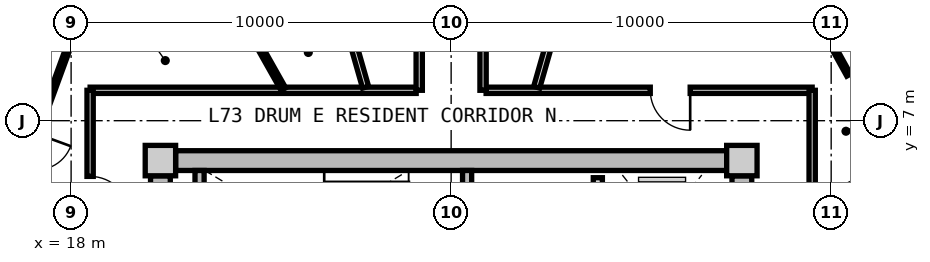
"""IFC4 building model, lengths in metres.
Left out: names, types, materials, properties, quantities, classifications, styles, units other than length and angle.
Written with IfcOpenShell. Run it as: python <this file> out.ifc"""

import sys

from ifc_helpers import new_model, si_unit, direction, frame, frame_2d, origin, origin_2d, place, context, subcontext, project, spatial, rectangle, extrude, source, transform, mapped, element, fill, save


model = new_model("IFC4")
c1 = context("Model", 3, precision=1e-05, world=origin(), true_north=direction((0.0, 1.0)))
c2 = subcontext(c1, "Body", "Model", "MODEL_VIEW")
j1 = project(units=[si_unit("LENGTHUNIT", "METRE"), si_unit("PLANEANGLEUNIT", "RADIAN")], contexts=[c1])
p1 = place(None, origin())
s1 = spatial("IfcSite", under=j1, at=p1, CompositionType="ELEMENT")
p2 = place(p1, origin())
s2 = spatial("IfcBuilding", under=s1, at=p2, CompositionType="ELEMENT")
p3 = place(p2, frame((0.0, 0.0, 235.25)))
s3 = spatial("IfcBuildingStorey", under=s2, at=p3, CompositionType="ELEMENT", Elevation=235.25)
m1 = source(origin(), c2, "Body", "SweptSolid", [
    extrude(rectangle(XDim=0.8, YDim=0.8, at=origin_2d()), origin(), (0.0, 0.0, 1.0), 3.05),
])
for number, where, z_axis, x_axis in (
    (1, (35.65, 5.95, 0.0), (0.0, 0.0, 1.0), (1.0, 0.0, 0.0)),
    (2, (20.35, 5.95, 0.0), (0.0, 0.0, 1.0), (1.0, 0.0, 0.0)),
):
    element("IfcColumn", number, at=place(p3, frame(where, z_axis=z_axis, x_axis=x_axis)), inside=s3, PredefinedType="COLUMN", context=c2, shape_type="MappedRepresentation", body=[
        mapped(m1, transform((0.0, 0.0, 0.0), x_axis=(1.0, 0.0, 0.0), y_axis=(0.0, 1.0, 0.0), z_axis=(0.0, 0.0, 1.0), scale=1.0)),
    ])
m2 = source(origin(), c2, "Body", "SweptSolid", [
    extrude(rectangle(XDim=14.5, YDim=0.52, at=frame_2d((7.25, 0.0))), origin(), (0.0, 0.0, 1.0), 2.81),
])
p4 = place(p3, frame((20.75, 5.95, 0.0), z_axis=(0.0, 0.0, 1.0), x_axis=(1.0, 0.0, 0.0)))
e3 = element("IfcWall", 3, at=p4, inside=s3, PredefinedType="SHEAR", context=c2, shape_type="MappedRepresentation", body=[
    mapped(m2, transform((0.0, 0.0, 0.0), x_axis=(1.0, 0.0, 0.0), y_axis=(0.0, 1.0, 0.0), z_axis=(0.0, 0.0, 1.0), scale=1.0)),
])
m3 = source(origin(), c2, "Body", "SweptSolid", [
    extrude(rectangle(XDim=11.1, YDim=0.52, at=frame_2d((5.55, 0.0))), origin(), (0.0, 0.0, 1.0), 2.81),
])
p5 = place(p3, frame((20.35, -5.55, 0.0), z_axis=(0.0, 0.0, 1.0), x_axis=(0.0, 1.0, 0.0)))
e4 = element("IfcWall", 4, at=p5, inside=s3, PredefinedType="SHEAR", context=c2, shape_type="MappedRepresentation", body=[
    mapped(m3, transform((0.0, 0.0, 0.0), x_axis=(1.0, 0.0, 0.0), y_axis=(0.0, 1.0, 0.0), z_axis=(0.0, 0.0, 1.0), scale=1.0)),
])
p6 = place(p5, frame((3.8, 0.0, 0.0)))
e5 = element("IfcOpeningElement", 5, at=p6, cuts=e4, PredefinedType="OPENING", context=c2, shape_type="SweptSolid", body=[
    extrude(rectangle(XDim=1.2, YDim=2.15, at=frame_2d((0.6, 1.075))), frame((0.0, 0.27, 0.0), z_axis=(0.0, -1.0, 0.0), x_axis=(1.0, 0.0, 0.0)), (0.0, 0.0, 1.0), 0.54),
])
p7 = place(p3, frame((35.65, 5.55, 0.0), z_axis=(0.0, 0.0, 1.0), x_axis=(0.0, -1.0, 0.0)))
e6 = element("IfcWall", 6, at=p7, inside=s3, PredefinedType="SHEAR", context=c2, shape_type="MappedRepresentation", body=[
    mapped(m3, transform((0.0, 0.0, 0.0), x_axis=(1.0, 0.0, 0.0), y_axis=(0.0, 1.0, 0.0), z_axis=(0.0, 0.0, 1.0), scale=1.0)),
])
p8 = place(p7, frame((5.65, 0.0, 0.0)))
e7 = element("IfcOpeningElement", 7, at=p8, cuts=e6, PredefinedType="OPENING", context=c2, shape_type="SweptSolid", body=[
    extrude(rectangle(XDim=1.2, YDim=2.15, at=frame_2d((0.6, 1.075))), frame((0.0, 0.27, 0.0), z_axis=(0.0, -1.0, 0.0), x_axis=(1.0, 0.0, 0.0)), (0.0, 0.0, 1.0), 0.54),
])
m4 = source(origin(), c2, "Body", "SweptSolid", [
    extrude(rectangle(XDim=3.24, YDim=0.24, at=frame_2d((1.62, 0.0))), origin(), (0.0, 0.0, 1.0), 2.81),
])
p9 = place(p3, frame((21.38, 2.45, 0.0), z_axis=(0.0, 0.0, 1.0), x_axis=(0.0, 1.0, 0.0)))
e8 = element("IfcWall", 8, at=p9, inside=s3, PredefinedType="PARTITIONING", context=c2, shape_type="MappedRepresentation", body=[
    mapped(m4, transform((0.0, 0.0, 0.0), x_axis=(1.0, 0.0, 0.0), y_axis=(0.0, 1.0, 0.0), z_axis=(0.0, 0.0, 1.0), scale=1.0)),
])
p10 = place(p3, frame((28.42, 2.45, 0.0), z_axis=(0.0, 0.0, 1.0), x_axis=(0.0, 1.0, 0.0)))
e9 = element("IfcWall", 9, at=p10, inside=s3, PredefinedType="PARTITIONING", context=c2, shape_type="MappedRepresentation", body=[
    mapped(m4, transform((0.0, 0.0, 0.0), x_axis=(1.0, 0.0, 0.0), y_axis=(0.0, 1.0, 0.0), z_axis=(0.0, 0.0, 1.0), scale=1.0)),
])
p11 = place(p10, frame((0.55, 0.0, 0.0)))
e10 = element("IfcOpeningElement", 10, at=p11, cuts=e9, PredefinedType="OPENING", context=c2, shape_type="SweptSolid", body=[
    extrude(rectangle(XDim=1.1, YDim=2.15, at=frame_2d((0.55, 1.075))), frame((0.0, 0.13, 0.0), z_axis=(0.0, -1.0, 0.0), x_axis=(1.0, 0.0, 0.0)), (0.0, 0.0, 1.0), 0.26),
])
m5 = source(origin(), c2, "Body", "SweptSolid", [
    extrude(rectangle(XDim=5.0, YDim=0.24, at=frame_2d((2.5, 0.0))), origin(), (0.0, 0.0, 1.0), 2.795),
])
p12 = place(p3, frame((31.86, 0.5, 0.0), z_axis=(0.0, 0.0, 1.0), x_axis=(0.0, 1.0, 0.0)))
e11 = element("IfcWall", 11, at=p12, inside=s3, PredefinedType="PARTITIONING", context=c2, shape_type="MappedRepresentation", body=[
    mapped(m5, transform((0.0, 0.0, 0.0), x_axis=(1.0, 0.0, 0.0), y_axis=(0.0, 1.0, 0.0), z_axis=(0.0, 0.0, 1.0), scale=1.0)),
])
p13 = place(p12, frame((3.05, 0.0, 0.0)))
e12 = element("IfcOpeningElement", 12, at=p13, cuts=e11, PredefinedType="OPENING", context=c2, shape_type="SweptSolid", body=[
    extrude(rectangle(XDim=1.3, YDim=2.2, at=frame_2d((0.65, 1.1))), frame((0.0, 0.13, 0.0), z_axis=(0.0, -1.0, 0.0), x_axis=(1.0, 0.0, 0.0)), (0.0, 0.0, 1.0), 0.26),
])
p14 = place(p12, frame((0.55, 0.0, 0.0)))
e13 = element("IfcOpeningElement", 13, at=p14, cuts=e11, PredefinedType="OPENING", context=c2, shape_type="SweptSolid", body=[
    extrude(rectangle(XDim=1.3, YDim=2.2, at=frame_2d((0.65, 1.1))), frame((0.0, 0.13, 0.0), z_axis=(0.0, -1.0, 0.0), x_axis=(1.0, 0.0, 0.0)), (0.0, 0.0, 1.0), 0.26),
])
m6 = source(origin(), c2, "Body", "SweptSolid", [
    extrude(rectangle(XDim=8.58, YDim=0.165, at=frame_2d((4.29, 0.0))), origin(), (0.0, 0.0, 1.0), 2.795),
])
p15 = place(p3, frame((18.5, 7.8, 0.0), z_axis=(0.0, 0.0, 1.0), x_axis=(1.0, 0.0, 0.0)))
e14 = element("IfcWall", 14, at=p15, inside=s3, PredefinedType="PARTITIONING", context=c2, shape_type="MappedRepresentation", body=[
    mapped(m6, transform((0.0, 0.0, 0.0), x_axis=(1.0, 0.0, 0.0), y_axis=(0.0, 1.0, 0.0), z_axis=(0.0, 0.0, 1.0), scale=1.0)),
])
p16 = place(p3, frame((28.92, 7.8, 0.0), z_axis=(0.0, 0.0, 1.0), x_axis=(1.0, 0.0, 0.0)))
e15 = element("IfcWall", 15, at=p16, inside=s3, PredefinedType="PARTITIONING", context=c2, shape_type="MappedRepresentation", body=[
    mapped(m6, transform((0.0, 0.0, 0.0), x_axis=(1.0, 0.0, 0.0), y_axis=(0.0, 1.0, 0.0), z_axis=(0.0, 0.0, 1.0), scale=1.0)),
])
p17 = place(p16, frame((4.32, 0.0, 0.0)))
e16 = element("IfcOpeningElement", 16, at=p17, cuts=e15, PredefinedType="OPENING", context=c2, shape_type="SweptSolid", body=[
    extrude(rectangle(XDim=1.05, YDim=2.15, at=frame_2d((0.525, 1.075))), frame((0.0, 0.093, 0.0), z_axis=(0.0, -1.0, 0.0), x_axis=(1.0, 0.0, 0.0)), (0.0, 0.0, 1.0), 0.185),
])
m7 = source(origin(), c2, "Body", "SweptSolid", [
    extrude(rectangle(XDim=6.88, YDim=0.165, at=frame_2d((3.44, 0.0))), origin(), (0.0, 0.0, 1.0), 2.795),
])
p18 = place(p3, frame((18.5, 0.92, 0.0), z_axis=(0.0, 0.0, 1.0), x_axis=(0.0, 1.0, 0.0)))
e17 = element("IfcWall", 17, at=p18, inside=s3, PredefinedType="PARTITIONING", context=c2, shape_type="MappedRepresentation", body=[
    mapped(m7, transform((0.0, 0.0, 0.0), x_axis=(1.0, 0.0, 0.0), y_axis=(0.0, 1.0, 0.0), z_axis=(0.0, 0.0, 1.0), scale=1.0)),
])
p19 = place(p18, frame((3.564, 0.0, 0.0)))
e18 = element("IfcOpeningElement", 18, at=p19, cuts=e17, PredefinedType="OPENING", context=c2, shape_type="SweptSolid", body=[
    extrude(rectangle(XDim=1.05, YDim=2.15, at=frame_2d((0.525, 1.075))), frame((0.0, 0.093, 0.0), z_axis=(0.0, -1.0, 0.0), x_axis=(1.0, 0.0, 0.0)), (0.0, 0.0, 1.0), 0.185),
])
p20 = place(p3, frame((37.5, 7.8, 0.0), z_axis=(0.0, 0.0, 1.0), x_axis=(0.0, -1.0, 0.0)))
e19 = element("IfcWall", 19, at=p20, inside=s3, PredefinedType="PARTITIONING", context=c2, shape_type="MappedRepresentation", body=[
    mapped(m7, transform((0.0, 0.0, 0.0), x_axis=(1.0, 0.0, 0.0), y_axis=(0.0, 1.0, 0.0), z_axis=(0.0, 0.0, 1.0), scale=1.0)),
])
m8 = source(origin(), c2, "Body", "SweptSolid", [
    extrude(rectangle(XDim=6.974, YDim=0.165, at=frame_2d((3.487, 0.0))), origin(), (0.0, 0.0, 1.0), 2.395),
])
for number, where, z_axis, x_axis in (
    (20, (30.251, 7.88, 0.0), (0.0, 0.0, 1.0), (0.275, 0.962, 0.0)),
    (21, (25.749, 7.88, 0.0), (0.0, 0.0, 1.0), (-0.275, 0.962, 0.0)),
):
    element("IfcWall", number, at=place(p3, frame(where, z_axis=z_axis, x_axis=x_axis)), inside=s3, PredefinedType="PARTITIONING", context=c2, shape_type="MappedRepresentation", body=[
        mapped(m8, transform((0.0, 0.0, 0.0), x_axis=(1.0, 0.0, 0.0), y_axis=(0.0, 1.0, 0.0), z_axis=(0.0, 0.0, 1.0), scale=1.0)),
    ])
m9 = source(origin(), c2, "Body", "SweptSolid", [
    extrude(rectangle(XDim=6.835, YDim=0.165, at=frame_2d((3.418, 0.0))), origin(), (0.0, 0.0, 1.0), 2.795),
])
p21 = place(p3, frame((27.16, 7.8, 0.0), z_axis=(0.0, 0.0, 1.0), x_axis=(0.0, 1.0, 0.0)))
e22 = element("IfcWall", 22, at=p21, inside=s3, PredefinedType="PARTITIONING", context=c2, shape_type="MappedRepresentation", body=[
    mapped(m9, transform((0.0, 0.0, 0.0), x_axis=(1.0, 0.0, 0.0), y_axis=(0.0, 1.0, 0.0), z_axis=(0.0, 0.0, 1.0), scale=1.0)),
])
p22 = place(p21, frame((2.943, 0.0, 0.0)))
e23 = element("IfcOpeningElement", 23, at=p22, cuts=e22, PredefinedType="OPENING", context=c2, shape_type="SweptSolid", body=[
    extrude(rectangle(XDim=0.95, YDim=2.1, at=frame_2d((0.475, 1.05))), frame((0.0, 0.093, 0.0), z_axis=(0.0, -1.0, 0.0), x_axis=(1.0, 0.0, 0.0)), (0.0, 0.0, 1.0), 0.185),
])
p23 = place(p3, frame((28.84, 14.635, 0.0), z_axis=(0.0, 0.0, 1.0), x_axis=(0.0, -1.0, 0.0)))
e24 = element("IfcWall", 24, at=p23, inside=s3, PredefinedType="PARTITIONING", context=c2, shape_type="MappedRepresentation", body=[
    mapped(m9, transform((0.0, 0.0, 0.0), x_axis=(1.0, 0.0, 0.0), y_axis=(0.0, 1.0, 0.0), z_axis=(0.0, 0.0, 1.0), scale=1.0)),
])
p24 = place(p23, frame((2.943, 0.0, 0.0)))
e25 = element("IfcOpeningElement", 25, at=p24, cuts=e24, PredefinedType="OPENING", context=c2, shape_type="SweptSolid", body=[
    extrude(rectangle(XDim=0.95, YDim=2.1, at=frame_2d((0.475, 1.05))), frame((0.0, 0.093, 0.0), z_axis=(0.0, -1.0, 0.0), x_axis=(1.0, 0.0, 0.0)), (0.0, 0.0, 1.0), 0.185),
])
m10 = source(origin(), c2, "Body", "SweptSolid", [
    extrude(rectangle(XDim=1.638, YDim=0.14, at=frame_2d((0.819, 0.0))), origin(), (0.0, 0.0, 1.0), 2.795),
])
p25 = place(p3, frame((37.53, 4.778, 0.0), z_axis=(0.0, 0.0, 1.0), x_axis=(0.893919977945, 0.448226586707, 0.0)))
e26 = element("IfcWall", 26, at=p25, inside=s3, PredefinedType="PARTITIONING", context=c2, shape_type="MappedRepresentation", body=[
    mapped(m10, transform((0.0, 0.0, 0.0), x_axis=(1.0, 0.0, 0.0), y_axis=(0.0, 1.0, 0.0), z_axis=(0.0, 0.0, 1.0), scale=1.0)),
])
m11 = source(origin(), c2, "Body", "SweptSolid", [
    extrude(rectangle(XDim=3.45, YDim=0.115, at=frame_2d((1.725, 0.0))), origin(), (0.0, 0.0, 1.0), 2.795),
])
p26 = place(p3, frame((39.525, 6.275, 0.0), z_axis=(0.0, 0.0, 1.0), x_axis=(-0.483659007882, 0.875256513312, 0.0)))
e27 = element("IfcWall", 27, at=p26, inside=s3, PredefinedType="PARTITIONING", context=c2, shape_type="MappedRepresentation", body=[
    mapped(m11, transform((0.0, 0.0, 0.0), x_axis=(1.0, 0.0, 0.0), y_axis=(0.0, 1.0, 0.0), z_axis=(0.0, 0.0, 1.0), scale=1.0)),
])
p27 = place(p26, frame((1.25, 0.0, 0.0)))
e28 = element("IfcOpeningElement", 28, at=p27, cuts=e27, PredefinedType="OPENING", context=c2, shape_type="SweptSolid", body=[
    extrude(rectangle(XDim=0.95, YDim=2.1, at=frame_2d((0.475, 1.05))), frame((0.0, 0.067, 0.0), z_axis=(0.0, -1.0, 0.0), x_axis=(1.0, 0.0, 0.0)), (0.0, 0.0, 1.0), 0.135),
])
m12 = source(origin(), c2, "Body", "SweptSolid", [
    extrude(rectangle(XDim=6.69, YDim=0.115, at=frame_2d((3.345, 0.0))), origin(), (0.0, 0.0, 1.0), 2.795),
])
p28 = place(p3, frame((18.083, 9.352, 0.0), z_axis=(0.0, 0.0, 1.0), x_axis=(-0.343693784919, -0.939081776102, 0.0)))
e29 = element("IfcWall", 29, at=p28, inside=s3, PredefinedType="PARTITIONING", context=c2, shape_type="MappedRepresentation", body=[
    mapped(m12, transform((0.0, 0.0, 0.0), x_axis=(1.0, 0.0, 0.0), y_axis=(0.0, 1.0, 0.0), z_axis=(0.0, 0.0, 1.0), scale=1.0)),
])
p29 = place(p28, frame((2.87, 0.0, 0.0)))
e30 = element("IfcOpeningElement", 30, at=p29, cuts=e29, PredefinedType="OPENING", context=c2, shape_type="SweptSolid", body=[
    extrude(rectangle(XDim=0.95, YDim=2.1, at=frame_2d((0.475, 1.05))), frame((0.0, 0.067, 0.0), z_axis=(0.0, -1.0, 0.0), x_axis=(1.0, 0.0, 0.0)), (0.0, 0.0, 1.0), 0.135),
])
m13 = source(origin(), c2, "Body", "SweptSolid", [
    extrude(rectangle(XDim=2.035, YDim=0.14, at=frame_2d((1.018, 0.0))), origin(), (0.0, 0.0, 1.0), 2.795),
])
p30 = place(p3, frame((23.585, 7.83, 0.0), z_axis=(0.0, 0.0, 1.0), x_axis=(-0.491092509169, 0.871107425888, 0.0)))
e31 = element("IfcWall", 31, at=p30, inside=s3, PredefinedType="PARTITIONING", context=c2, shape_type="MappedRepresentation", body=[
    mapped(m13, transform((0.0, 0.0, 0.0), x_axis=(1.0, 0.0, 0.0), y_axis=(0.0, 1.0, 0.0), z_axis=(0.0, 0.0, 1.0), scale=1.0)),
])
m14 = source(origin(), c2, "Body", "SweptSolid", [
    extrude(rectangle(XDim=1.05, YDim=2.15, at=frame_2d((0.525, 1.075))), frame((0.0, 0.025, 0.0), z_axis=(0.0, -1.0, 0.0), x_axis=(1.0, 0.0, 0.0)), (0.0, 0.0, 1.0), 0.05),
])
p31 = place(p17, frame((1.05, 0.0, 0.0), z_axis=(0.0, 0.0, 1.0), x_axis=(-1.0, 0.0, 0.0)))
e32 = element("IfcDoor", 32, at=p31, inside=s3, OperationType="SINGLE_SWING_LEFT", PredefinedType="DOOR", context=c2, shape_type="MappedRepresentation", body=[
    mapped(m14, transform((0.0, 0.0, 0.0), x_axis=(1.0, 0.0, 0.0), y_axis=(0.0, 1.0, 0.0), z_axis=(0.0, 0.0, 1.0), scale=1.0)),
])
fill(e16, e32)
m15 = source(origin(), c2, "Body", "SweptSolid", [
    extrude(rectangle(XDim=0.95, YDim=2.1, at=frame_2d((0.475, 1.05))), frame((0.0, 0.025, 0.0), z_axis=(0.0, -1.0, 0.0), x_axis=(1.0, 0.0, 0.0)), (0.0, 0.0, 1.0), 0.05),
])
p32 = place(p27, frame((0.95, 0.0, 0.0), z_axis=(0.0, 0.0, 1.0), x_axis=(-1.0, 0.0, 0.0)))
e33 = element("IfcDoor", 33, at=p32, inside=s3, OperationType="SINGLE_SWING_LEFT", PredefinedType="DOOR", context=c2, shape_type="MappedRepresentation", body=[
    mapped(m15, transform((0.0, 0.0, 0.0), x_axis=(1.0, 0.0, 0.0), y_axis=(0.0, 1.0, 0.0), z_axis=(0.0, 0.0, 1.0), scale=1.0)),
])
fill(e28, e33)
p33 = place(p19, frame((1.05, 0.0, 0.0), z_axis=(0.0, 0.0, 1.0), x_axis=(-1.0, 0.0, 0.0)))
e34 = element("IfcDoor", 34, at=p33, inside=s3, OperationType="SINGLE_SWING_RIGHT", PredefinedType="DOOR", context=c2, shape_type="MappedRepresentation", body=[
    mapped(m14, transform((0.0, 0.0, 0.0), x_axis=(1.0, 0.0, 0.0), y_axis=(0.0, 1.0, 0.0), z_axis=(0.0, 0.0, 1.0), scale=1.0)),
])
fill(e18, e34)
save(model, sys.argv[1])
